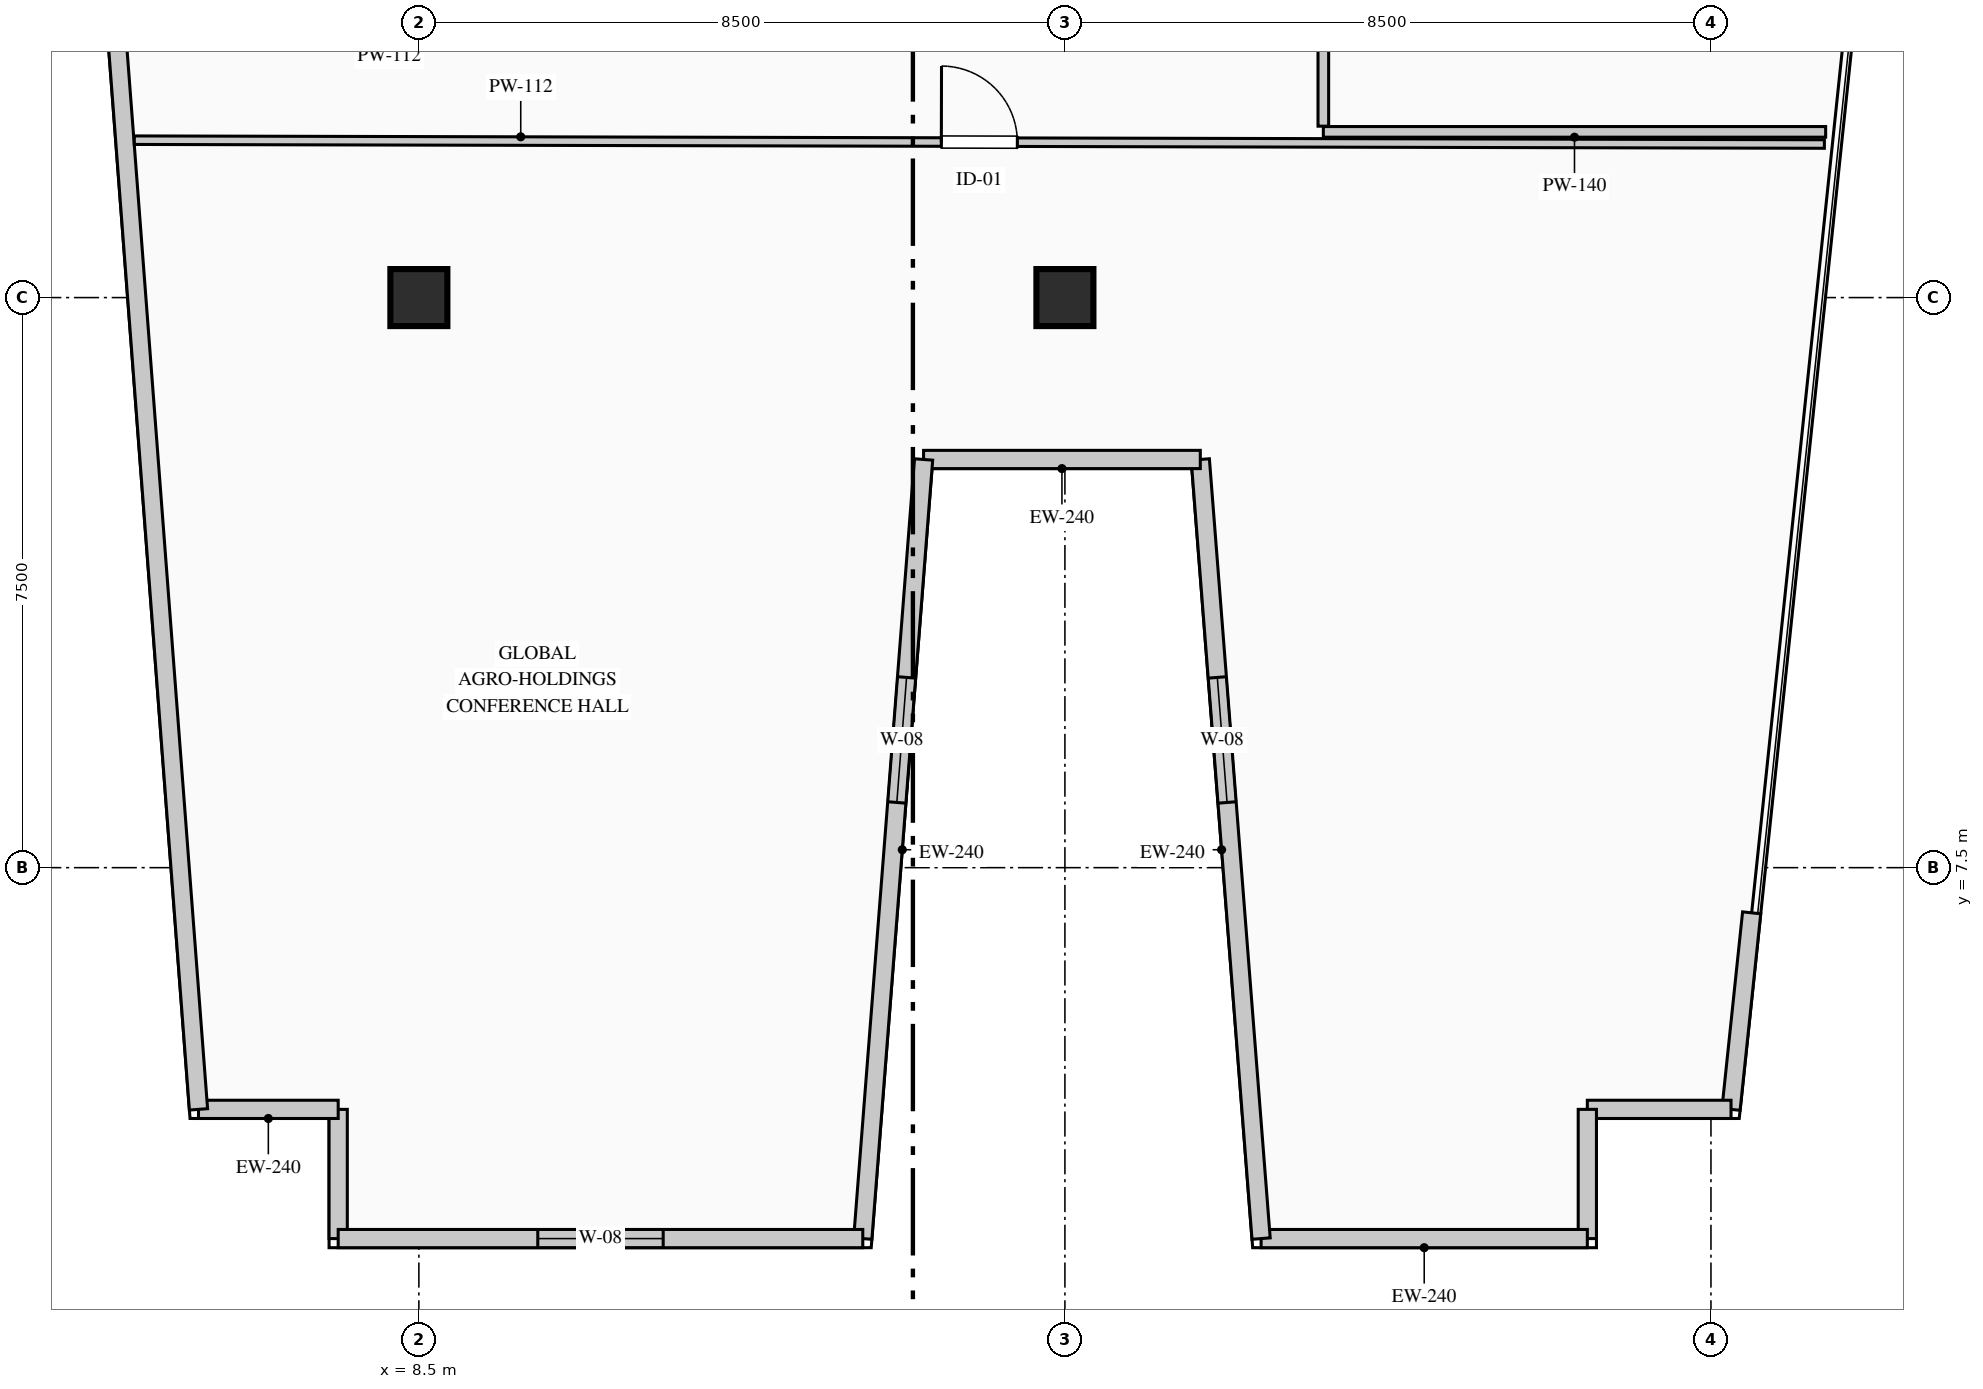
"""IFC4 building model, lengths in metres.
Left out: names, types, materials, properties, quantities, classifications, styles, units other than length and angle.
Written with IfcOpenShell. Run it as: python <this file> out.ifc"""

import sys

from ifc_helpers import new_model, si_unit, direction, frame, frame_2d, origin, origin_2d, place, context, subcontext, project, spatial, rectangle, extrude, element, fill, save


model = new_model("IFC4")
c1 = context("Model", 3, precision=1e-05, world=origin(), true_north=direction((0.0, 1.0)))
c2 = subcontext(c1, "Body", "Model", "MODEL_VIEW")
j1 = project(units=[si_unit("LENGTHUNIT", "METRE"), si_unit("PLANEANGLEUNIT", "RADIAN")], contexts=[c1])
p1 = place(None, origin())
s1 = spatial("IfcSite", under=j1, at=p1, CompositionType="ELEMENT")
p2 = place(p1, origin())
s2 = spatial("IfcBuilding", under=s1, at=p2, CompositionType="ELEMENT")
p3 = place(p2, frame((0.0, 0.0, 296.2)))
s3 = spatial("IfcBuildingStorey", under=s2, at=p3, CompositionType="ELEMENT", Elevation=296.2)
for number, where, z_axis, x_axis in (
    (1, (8.5, 15.0, 0.0), (0.0, 0.0, 1.0), (1.0, 0.0, 0.0)),
    (2, (17.0, 15.0, 0.0), (0.0, 0.0, 1.0), (1.0, 0.0, 0.0)),
):
    element("IfcColumn", number, at=place(p3, frame(where, z_axis=z_axis, x_axis=x_axis)), inside=s3, PredefinedType="COLUMN", context=c2, shape_type="SweptSolid", body=[
        extrude(rectangle(XDim=0.75, YDim=0.75, at=origin_2d()), origin(), (0.0, 0.0, 1.0), 3.95),
    ])
p4 = place(p3, frame((7.438, 2.62, 0.0), z_axis=(0.0, 0.0, 1.0), x_axis=(0.0, 1.0, 0.0)))
e3 = element("IfcWall", 3, at=p4, inside=s3, PredefinedType="STANDARD", context=c2, shape_type="SweptSolid", body=[
    extrude(rectangle(XDim=1.7, YDim=0.24, at=frame_2d((0.85, 0.0))), origin(), (0.0, 0.0, 1.0), 3.7),
])
p5 = place(p3, frame((7.438, 4.32, 0.0), z_axis=(0.0, 0.0, 1.0), x_axis=(-1.0, 0.0, 0.0)))
e4 = element("IfcWall", 4, at=p5, inside=s3, PredefinedType="STANDARD", context=c2, shape_type="SweptSolid", body=[
    extrude(rectangle(XDim=1.838, YDim=0.24, at=frame_2d((0.919, 0.0))), origin(), (0.0, 0.0, 1.0), 3.7),
])
p6 = place(p3, frame((5.6, 4.32, 0.0), z_axis=(0.0, 0.0, 1.0), x_axis=(-0.075839920993, 0.997120006009, 0.0)))
e5 = element("IfcWall", 5, at=p6, inside=s3, PredefinedType="STANDARD", context=c2, shape_type="SweptSolid", body=[
    extrude(rectangle(XDim=37.468, YDim=0.24, at=frame_2d((18.734, 0.0))), origin(), (0.0, 0.0, 1.0), 3.7),
])
p7 = place(p6, frame((23.154, 0.0, 0.9)))
e6 = element("IfcOpeningElement", 6, at=p7, cuts=e5, PredefinedType="OPENING", context=c2, shape_type="SweptSolid", body=[
    extrude(rectangle(XDim=1.65, YDim=1.95, at=frame_2d((0.825, 0.975))), frame((0.0, 0.13, 0.0), z_axis=(0.0, -1.0, 0.0), x_axis=(1.0, 0.0, 0.0)), (0.0, 0.0, 1.0), 0.26),
])
p8 = place(p3, frame((26.036, 6.906, 0.0), z_axis=(0.0, 0.0, 1.0), x_axis=(-0.104513699976, -0.994523446942, 0.0)))
e7 = element("IfcWall", 7, at=p8, inside=s3, PredefinedType="STANDARD", context=c2, shape_type="SweptSolid", body=[
    extrude(rectangle(XDim=2.6, YDim=0.24, at=frame_2d((1.3, 0.0))), origin(), (0.0, 0.0, 1.0), 3.7),
])
p9 = place(p3, frame((25.764, 4.32, 0.0), z_axis=(0.0, 0.0, 1.0), x_axis=(-1.0, 0.0, 0.0)))
e8 = element("IfcWall", 8, at=p9, inside=s3, PredefinedType="STANDARD", context=c2, shape_type="SweptSolid", body=[
    extrude(rectangle(XDim=1.89, YDim=0.24, at=frame_2d((0.945, 0.0))), origin(), (0.0, 0.0, 1.0), 3.7),
])
p10 = place(p3, frame((23.874, 4.32, 0.0), z_axis=(0.0, 0.0, 1.0), x_axis=(0.0, -1.0, 0.0)))
e9 = element("IfcWall", 9, at=p10, inside=s3, PredefinedType="STANDARD", context=c2, shape_type="SweptSolid", body=[
    extrude(rectangle(XDim=1.7, YDim=0.24, at=frame_2d((0.85, 0.0))), origin(), (0.0, 0.0, 1.0), 3.7),
])
p11 = place(p3, frame((23.874, 2.62, 0.0), z_axis=(0.0, 0.0, 1.0), x_axis=(-1.0, 0.0, 0.0)))
e10 = element("IfcWall", 10, at=p11, inside=s3, PredefinedType="STANDARD", context=c2, shape_type="SweptSolid", body=[
    extrude(rectangle(XDim=4.292, YDim=0.24, at=frame_2d((2.146, 0.0))), origin(), (0.0, 0.0, 1.0), 3.7),
])
p12 = place(p3, frame((19.581, 2.62, 0.0), z_axis=(0.0, 0.0, 1.0), x_axis=(-0.077816860153, 0.996967670627, 0.0)))
e11 = element("IfcWall", 11, at=p12, inside=s3, PredefinedType="STANDARD", context=c2, shape_type="SweptSolid", body=[
    extrude(rectangle(XDim=10.281, YDim=0.24, at=frame_2d((5.141, 0.0))), origin(), (0.0, 0.0, 1.0), 3.7),
])
p13 = place(p12, frame((5.755, 0.0, 0.9)))
e12 = element("IfcOpeningElement", 12, at=p13, cuts=e11, PredefinedType="OPENING", context=c2, shape_type="SweptSolid", body=[
    extrude(rectangle(XDim=1.65, YDim=1.95, at=frame_2d((0.825, 0.975))), frame((0.0, 0.13, 0.0), z_axis=(0.0, -1.0, 0.0), x_axis=(1.0, 0.0, 0.0)), (0.0, 0.0, 1.0), 0.26),
])
p14 = place(p3, frame((18.781, 12.87, 0.0), z_axis=(0.0, 0.0, 1.0), x_axis=(-1.0, 0.0, 0.0)))
e13 = element("IfcWall", 13, at=p14, inside=s3, PredefinedType="STANDARD", context=c2, shape_type="SweptSolid", body=[
    extrude(rectangle(XDim=3.641, YDim=0.24, at=frame_2d((1.82, 0.0))), origin(), (0.0, 0.0, 1.0), 3.7),
])
p15 = place(p3, frame((15.14, 12.87, 0.0), z_axis=(0.0, 0.0, 1.0), x_axis=(-0.077793257511, -0.996969512616, 0.0)))
e14 = element("IfcWall", 14, at=p15, inside=s3, PredefinedType="STANDARD", context=c2, shape_type="SweptSolid", body=[
    extrude(rectangle(XDim=10.281, YDim=0.24, at=frame_2d((5.141, 0.0))), origin(), (0.0, 0.0, 1.0), 3.7),
])
p16 = place(p15, frame((2.876, 0.0, 0.9)))
e15 = element("IfcOpeningElement", 15, at=p16, cuts=e14, PredefinedType="OPENING", context=c2, shape_type="SweptSolid", body=[
    extrude(rectangle(XDim=1.65, YDim=1.95, at=frame_2d((0.825, 0.975))), frame((0.0, 0.13, 0.0), z_axis=(0.0, -1.0, 0.0), x_axis=(1.0, 0.0, 0.0)), (0.0, 0.0, 1.0), 0.26),
])
p17 = place(p3, frame((14.341, 2.62, 0.0), z_axis=(0.0, 0.0, 1.0), x_axis=(-1.0, 0.0, 0.0)))
e16 = element("IfcWall", 16, at=p17, inside=s3, PredefinedType="STANDARD", context=c2, shape_type="SweptSolid", body=[
    extrude(rectangle(XDim=6.902, YDim=0.24, at=frame_2d((3.451, 0.0))), origin(), (0.0, 0.0, 1.0), 3.7),
])
p18 = place(p17, frame((2.626, 0.0, 0.9)))
e17 = element("IfcOpeningElement", 17, at=p18, cuts=e16, PredefinedType="OPENING", context=c2, shape_type="SweptSolid", body=[
    extrude(rectangle(XDim=1.65, YDim=1.95, at=frame_2d((0.825, 0.975))), frame((0.0, 0.13, 0.0), z_axis=(0.0, -1.0, 0.0), x_axis=(1.0, 0.0, 0.0)), (0.0, 0.0, 1.0), 0.26),
])
p19 = place(p3, frame((27.009, 17.18, 0.0), z_axis=(0.0, 0.0, 1.0), x_axis=(-1.0, 0.0, 0.0)))
e18 = element("IfcWall", 18, at=p19, inside=s3, PredefinedType="PARTITIONING", context=c2, shape_type="SweptSolid", body=[
    extrude(rectangle(XDim=6.609, YDim=0.14, at=frame_2d((3.305, 0.0))), origin(), (0.0, 0.0, 1.0), 3.7),
])
p20 = place(p3, frame((20.4, 17.255, 0.0), z_axis=(0.0, 0.0, 1.0), x_axis=(0.0, 1.0, 0.0)))
e19 = element("IfcWall", 19, at=p20, inside=s3, PredefinedType="PARTITIONING", context=c2, shape_type="SweptSolid", body=[
    extrude(rectangle(XDim=3.995, YDim=0.14, at=frame_2d((1.998, 0.0))), origin(), (0.0, 0.0, 1.0), 3.7),
])
p21 = place(p20, frame((1.522, 0.0, 0.0)))
e20 = element("IfcOpeningElement", 20, at=p21, cuts=e19, PredefinedType="OPENING", context=c2, shape_type="SweptSolid", body=[
    extrude(rectangle(XDim=0.95, YDim=2.15, at=frame_2d((0.475, 1.075))), frame((0.0, 0.08, 0.0), z_axis=(0.0, -1.0, 0.0), x_axis=(1.0, 0.0, 0.0)), (0.0, 0.0, 1.0), 0.16),
])
p22 = place(p3, frame((4.756, 17.071, 0.0), z_axis=(0.0, 0.0, 1.0), x_axis=(0.999997417422, -0.00227269645, 0.0)))
e21 = element("IfcWall", 21, at=p22, inside=s3, PredefinedType="PARTITIONING", context=c2, shape_type="SweptSolid", body=[
    extrude(rectangle(XDim=22.237, YDim=0.112, at=frame_2d((11.118, 0.0))), origin(), (0.0, 0.0, 1.0), 3.7),
])
p23 = place(p22, frame((10.618, 0.0, 0.0)))
e22 = element("IfcOpeningElement", 22, at=p23, cuts=e21, PredefinedType="OPENING", context=c2, shape_type="SweptSolid", body=[
    extrude(rectangle(XDim=1.0, YDim=2.15, at=frame_2d((0.5, 1.075))), frame((0.0, 0.066, 0.0), z_axis=(0.0, -1.0, 0.0), x_axis=(1.0, 0.0, 0.0)), (0.0, 0.0, 1.0), 0.132),
])
p24 = place(p13, origin())
e23 = element("IfcWindow", 23, at=p24, inside=s3, PartitioningType="SINGLE_PANEL", PredefinedType="WINDOW", context=c2, shape_type="SweptSolid", body=[
    extrude(rectangle(XDim=1.65, YDim=1.95, at=frame_2d((0.825, 0.975))), frame((0.0, 0.03, 0.0), z_axis=(0.0, -1.0, 0.0), x_axis=(1.0, 0.0, 0.0)), (0.0, 0.0, 1.0), 0.06),
])
fill(e12, e23)
p25 = place(p16, origin())
e24 = element("IfcWindow", 24, at=p25, inside=s3, PartitioningType="SINGLE_PANEL", PredefinedType="WINDOW", context=c2, shape_type="SweptSolid", body=[
    extrude(rectangle(XDim=1.65, YDim=1.95, at=frame_2d((0.825, 0.975))), frame((0.0, 0.03, 0.0), z_axis=(0.0, -1.0, 0.0), x_axis=(1.0, 0.0, 0.0)), (0.0, 0.0, 1.0), 0.06),
])
fill(e15, e24)
p26 = place(p18, origin())
e25 = element("IfcWindow", 25, at=p26, inside=s3, PartitioningType="SINGLE_PANEL", PredefinedType="WINDOW", context=c2, shape_type="SweptSolid", body=[
    extrude(rectangle(XDim=1.65, YDim=1.95, at=frame_2d((0.825, 0.975))), frame((0.0, 0.03, 0.0), z_axis=(0.0, -1.0, 0.0), x_axis=(1.0, 0.0, 0.0)), (0.0, 0.0, 1.0), 0.06),
])
fill(e17, e25)
p27 = place(p23, origin())
e26 = element("IfcDoor", 26, at=p27, inside=s3, OperationType="SINGLE_SWING_LEFT", PredefinedType="DOOR", context=c2, shape_type="SweptSolid", body=[
    extrude(rectangle(XDim=1.0, YDim=2.15, at=frame_2d((0.5, 1.075))), frame((0.0, 0.025, 0.0), z_axis=(0.0, -1.0, 0.0), x_axis=(1.0, 0.0, 0.0)), (0.0, 0.0, 1.0), 0.05),
])
fill(e22, e26)
save(model, sys.argv[1])
